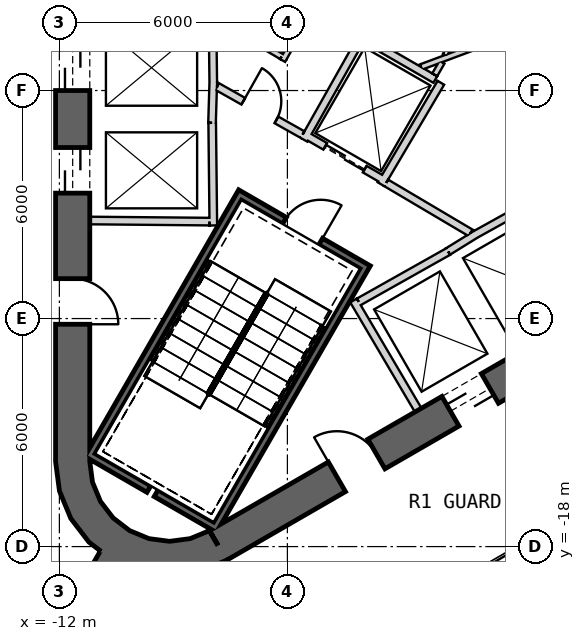
"""IFC4 building model, lengths in metres.
Left out: names, types, materials, properties, quantities, classifications, styles, units other than length and angle.
Written with IfcOpenShell. Run it as: python <this file> out.ifc"""

import sys

from ifc_helpers import new_model, si_unit, direction, frame, frame_2d, origin, place, context, subcontext, project, spatial, polyline, rectangle, outline, extrude, element, fill, save


model = new_model("IFC4")
c1 = context("Model", 3, precision=1e-05, world=origin(), true_north=direction((0.0, 1.0)))
c2 = subcontext(c1, "Body", "Model", "MODEL_VIEW")
j1 = project(units=[si_unit("LENGTHUNIT", "METRE"), si_unit("PLANEANGLEUNIT", "RADIAN")], contexts=[c1])
p1 = place(None, origin())
s1 = spatial("IfcSite", under=j1, at=p1, CompositionType="ELEMENT")
p2 = place(p1, origin())
s2 = spatial("IfcBuilding", under=s1, at=p2, CompositionType="ELEMENT")
p3 = place(p2, frame((0.0, 0.0, 15.5)))
s3 = spatial("IfcBuildingStorey", under=s2, at=p3, CompositionType="ELEMENT", Elevation=15.5)
p4 = place(p3, frame((-11.65, 15.762, 0.0), z_axis=(0.0, 0.0, 1.0), x_axis=(0.0, -1.0, 0.0)))
e1 = element("IfcWall", 1, at=p4, inside=s3, PredefinedType="SHEAR", context=c2, shape_type="SweptSolid", body=[
    extrude(rectangle(XDim=31.523, YDim=0.9, at=frame_2d((15.762, 0.0))), origin(), (0.0, 0.0, 1.0), 6.0),
])
p5 = place(p4, frame((7.062, 0.0, 0.0)))
e2 = element("IfcOpeningElement", 2, at=p5, cuts=e1, PredefinedType="OPENING", context=c2, shape_type="SweptSolid", body=[
    extrude(rectangle(XDim=1.2, YDim=2.4, at=frame_2d((0.6, 1.2))), frame((0.0, 0.46, 0.0), z_axis=(0.0, -1.0, 0.0), x_axis=(1.0, 0.0, 0.0)), (0.0, 0.0, 1.0), 0.92),
])
p6 = place(p4, frame((9.762, 0.0, 0.0)))
e3 = element("IfcOpeningElement", 3, at=p6, cuts=e1, PredefinedType="OPENING", context=c2, shape_type="SweptSolid", body=[
    extrude(rectangle(XDim=1.2, YDim=2.4, at=frame_2d((0.6, 1.2))), frame((0.0, 0.46, 0.0), z_axis=(0.0, -1.0, 0.0), x_axis=(1.0, 0.0, 0.0)), (0.0, 0.0, 1.0), 0.92),
])
p7 = place(p4, frame((12.462, 0.0, 0.0)))
e4 = element("IfcOpeningElement", 4, at=p7, cuts=e1, PredefinedType="OPENING", context=c2, shape_type="SweptSolid", body=[
    extrude(rectangle(XDim=1.2, YDim=2.4, at=frame_2d((0.6, 1.2))), frame((0.0, 0.46, 0.0), z_axis=(0.0, -1.0, 0.0), x_axis=(1.0, 0.0, 0.0)), (0.0, 0.0, 1.0), 0.92),
])
p8 = place(p4, frame((15.162, 0.0, 0.0)))
e5 = element("IfcOpeningElement", 5, at=p8, cuts=e1, PredefinedType="OPENING", context=c2, shape_type="SweptSolid", body=[
    extrude(rectangle(XDim=1.2, YDim=2.4, at=frame_2d((0.6, 1.2))), frame((0.0, 0.46, 0.0), z_axis=(0.0, -1.0, 0.0), x_axis=(1.0, 0.0, 0.0)), (0.0, 0.0, 1.0), 0.92),
])
p9 = place(p4, frame((17.862, 0.0, 0.0)))
e6 = element("IfcOpeningElement", 6, at=p9, cuts=e1, PredefinedType="OPENING", context=c2, shape_type="SweptSolid", body=[
    extrude(rectangle(XDim=1.2, YDim=2.4, at=frame_2d((0.6, 1.2))), frame((0.0, 0.46, 0.0), z_axis=(0.0, -1.0, 0.0), x_axis=(1.0, 0.0, 0.0)), (0.0, 0.0, 1.0), 0.92),
])
p10 = place(p4, frame((20.562, 0.0, 0.0)))
e7 = element("IfcOpeningElement", 7, at=p10, cuts=e1, PredefinedType="OPENING", context=c2, shape_type="SweptSolid", body=[
    extrude(rectangle(XDim=1.2, YDim=2.4, at=frame_2d((0.6, 1.2))), frame((0.0, 0.46, 0.0), z_axis=(0.0, -1.0, 0.0), x_axis=(1.0, 0.0, 0.0)), (0.0, 0.0, 1.0), 0.92),
])
p11 = place(p4, frame((23.262, 0.0, 0.0)))
e8 = element("IfcOpeningElement", 8, at=p11, cuts=e1, PredefinedType="OPENING", context=c2, shape_type="SweptSolid", body=[
    extrude(rectangle(XDim=1.2, YDim=2.4, at=frame_2d((0.6, 1.2))), frame((0.0, 0.46, 0.0), z_axis=(0.0, -1.0, 0.0), x_axis=(1.0, 0.0, 0.0)), (0.0, 0.0, 1.0), 0.92),
])
p12 = place(p4, frame((3.612, 0.0, 0.0)))
e9 = element("IfcOpeningElement", 9, at=p12, cuts=e1, PredefinedType="OPENING", context=c2, shape_type="SweptSolid", body=[
    extrude(rectangle(XDim=1.2, YDim=2.4, at=frame_2d((0.6, 1.2))), frame((0.0, 0.46, 0.0), z_axis=(0.0, -1.0, 0.0), x_axis=(1.0, 0.0, 0.0)), (0.0, 0.0, 1.0), 0.92),
])
p13 = place(p4, frame((26.712, 0.0, 0.0)))
e10 = element("IfcOpeningElement", 10, at=p13, cuts=e1, PredefinedType="OPENING", context=c2, shape_type="SweptSolid", body=[
    extrude(rectangle(XDim=1.2, YDim=2.4, at=frame_2d((0.6, 1.2))), frame((0.0, 0.46, 0.0), z_axis=(0.0, -1.0, 0.0), x_axis=(1.0, 0.0, 0.0)), (0.0, 0.0, 1.0), 0.92),
])
p14 = place(p3, frame((-7.825, -17.97, 0.0), z_axis=(0.0, 0.0, 1.0), x_axis=(0.866028369851, 0.499994862586, 0.0)))
e11 = element("IfcWall", 11, at=p14, inside=s3, PredefinedType="SHEAR", context=c2, shape_type="SweptSolid", body=[
    extrude(rectangle(XDim=31.523, YDim=0.9, at=frame_2d((15.762, 0.0))), origin(), (0.0, 0.0, 1.0), 6.0),
])
p15 = place(p14, frame((7.062, 0.0, 0.0)))
e12 = element("IfcOpeningElement", 12, at=p15, cuts=e11, PredefinedType="OPENING", context=c2, shape_type="SweptSolid", body=[
    extrude(rectangle(XDim=1.2, YDim=2.4, at=frame_2d((0.6, 1.2))), frame((0.0, 0.46, 0.0), z_axis=(0.0, -1.0, 0.0), x_axis=(1.0, 0.0, 0.0)), (0.0, 0.0, 1.0), 0.92),
])
p16 = place(p14, frame((9.762, 0.0, 0.0)))
e13 = element("IfcOpeningElement", 13, at=p16, cuts=e11, PredefinedType="OPENING", context=c2, shape_type="SweptSolid", body=[
    extrude(rectangle(XDim=1.2, YDim=2.4, at=frame_2d((0.6, 1.2))), frame((0.0, 0.46, 0.0), z_axis=(0.0, -1.0, 0.0), x_axis=(1.0, 0.0, 0.0)), (0.0, 0.0, 1.0), 0.92),
])
p17 = place(p14, frame((12.462, 0.0, 0.0)))
e14 = element("IfcOpeningElement", 14, at=p17, cuts=e11, PredefinedType="OPENING", context=c2, shape_type="SweptSolid", body=[
    extrude(rectangle(XDim=1.2, YDim=2.4, at=frame_2d((0.6, 1.2))), frame((0.0, 0.46, 0.0), z_axis=(0.0, -1.0, 0.0), x_axis=(1.0, 0.0, 0.0)), (0.0, 0.0, 1.0), 0.92),
])
p18 = place(p14, frame((15.162, 0.0, 0.0)))
e15 = element("IfcOpeningElement", 15, at=p18, cuts=e11, PredefinedType="OPENING", context=c2, shape_type="SweptSolid", body=[
    extrude(rectangle(XDim=1.2, YDim=2.4, at=frame_2d((0.6, 1.2))), frame((0.0, 0.46, 0.0), z_axis=(0.0, -1.0, 0.0), x_axis=(1.0, 0.0, 0.0)), (0.0, 0.0, 1.0), 0.92),
])
p19 = place(p14, frame((17.862, 0.0, 0.0)))
e16 = element("IfcOpeningElement", 16, at=p19, cuts=e11, PredefinedType="OPENING", context=c2, shape_type="SweptSolid", body=[
    extrude(rectangle(XDim=1.2, YDim=2.4, at=frame_2d((0.6, 1.2))), frame((0.0, 0.46, 0.0), z_axis=(0.0, -1.0, 0.0), x_axis=(1.0, 0.0, 0.0)), (0.0, 0.0, 1.0), 0.92),
])
p20 = place(p14, frame((20.562, 0.0, 0.0)))
e17 = element("IfcOpeningElement", 17, at=p20, cuts=e11, PredefinedType="OPENING", context=c2, shape_type="SweptSolid", body=[
    extrude(rectangle(XDim=1.2, YDim=2.4, at=frame_2d((0.6, 1.2))), frame((0.0, 0.46, 0.0), z_axis=(0.0, -1.0, 0.0), x_axis=(1.0, 0.0, 0.0)), (0.0, 0.0, 1.0), 0.92),
])
p21 = place(p14, frame((26.712, 0.0, 0.0)))
e18 = element("IfcOpeningElement", 18, at=p21, cuts=e11, PredefinedType="OPENING", context=c2, shape_type="SweptSolid", body=[
    extrude(rectangle(XDim=1.2, YDim=2.4, at=frame_2d((0.6, 1.2))), frame((0.0, 0.46, 0.0), z_axis=(0.0, -1.0, 0.0), x_axis=(1.0, 0.0, 0.0)), (0.0, 0.0, 1.0), 0.92),
])
p22 = place(p14, frame((3.612, 0.0, 0.0)))
e19 = element("IfcOpeningElement", 19, at=p22, cuts=e11, PredefinedType="OPENING", context=c2, shape_type="SweptSolid", body=[
    extrude(rectangle(XDim=1.2, YDim=2.4, at=frame_2d((0.6, 1.2))), frame((0.0, 0.46, 0.0), z_axis=(0.0, -1.0, 0.0), x_axis=(1.0, 0.0, 0.0)), (0.0, 0.0, 1.0), 0.92),
])
p23 = place(p3, origin())
e20 = element("IfcWall", 20, at=p23, inside=s3, PredefinedType="SHEAR", context=c2, shape_type="SweptSolid", body=[
    extrude(outline(polyline([(-12.1, -15.762), (-11.998, -16.538), (-11.698, -17.262), (-11.221, -17.883), (-10.6, -18.36), (-9.876, -18.659), (-9.1, -18.762), (-8.323, -18.659), (-7.6, -18.36), (-8.05, -17.58), (-8.556, -17.79), (-9.1, -17.862), (-9.644, -17.79), (-10.15, -17.58), (-10.585, -17.247), (-10.919, -16.812), (-11.128, -16.305), (-11.2, -15.762), (-12.1, -15.762)])), origin(), (0.0, 0.0, 1.0), 6.0),
])
p24 = place(p3, frame((-10.575, -18.316, 0.0), z_axis=(0.0, 0.0, 1.0), x_axis=(-0.499996575515, -0.866027380903, 0.0)))
e21 = element("IfcWall", 21, at=p24, inside=s3, PredefinedType="SHEAR", context=c2, shape_type="SweptSolid", body=[
    extrude(rectangle(XDim=13.954, YDim=0.8, at=frame_2d((6.977, 0.0))), origin(), (0.0, 0.0, 1.0), 6.0),
])
p25 = place(p24, frame((2.05, 0.0, 0.0)))
e22 = element("IfcOpeningElement", 22, at=p25, cuts=e21, PredefinedType="OPENING", context=c2, shape_type="SweptSolid", body=[
    extrude(rectangle(XDim=1.4, YDim=2.4, at=frame_2d((0.7, 1.2))), frame((0.0, 0.41, 0.0), z_axis=(0.0, -1.0, 0.0), x_axis=(1.0, 0.0, 0.0)), (0.0, 0.0, 1.0), 0.82),
])
p26 = place(p3, frame((-7.95, -5.772, 0.0), z_axis=(0.0, 0.0, 1.0), x_axis=(-0.030803413295, -0.999525462272, 0.0)))
e23 = element("IfcWall", 23, at=p26, inside=s3, PredefinedType="PLUMBINGWALL", context=c2, shape_type="SweptSolid", body=[
    extrude(rectangle(XDim=1.078, YDim=0.2, at=frame_2d((0.539, 0.0))), origin(), (0.0, 0.0, 1.0), 5.7),
])
p27 = place(p3, frame((-7.971, -4.05, 0.0), z_axis=(0.0, 0.0, 1.0), x_axis=(0.012042535896, -0.999927486035, 0.0)))
e24 = element("IfcWall", 24, at=p27, inside=s3, PredefinedType="PLUMBINGWALL", context=c2, shape_type="SweptSolid", body=[
    extrude(rectangle(XDim=1.845, YDim=0.2, at=frame_2d((0.922, 0.0))), origin(), (0.0, 0.0, 1.0), 5.7),
])
p28 = place(p3, frame((-7.979, -6.85, 0.0), z_axis=(0.0, 0.0, 1.0), x_axis=(0.011121475088, -0.999938154483, 0.0)))
e25 = element("IfcWall", 25, at=p28, inside=s3, PredefinedType="PLUMBINGWALL", context=c2, shape_type="SweptSolid", body=[
    extrude(rectangle(XDim=2.7, YDim=0.2, at=frame_2d((1.35, 0.0))), origin(), (0.0, 0.0, 1.0), 5.7),
])
p29 = place(p3, frame((-8.05, -9.449, 0.0), z_axis=(0.0, 0.0, 1.0), x_axis=(-0.999957467379, 0.009222983926, 0.0)))
e26 = element("IfcWall", 26, at=p29, inside=s3, PredefinedType="PLUMBINGWALL", context=c2, shape_type="SweptSolid", body=[
    extrude(rectangle(XDim=3.15, YDim=0.2, at=frame_2d((1.575, 0.0))), origin(), (0.0, 0.0, 1.0), 5.7),
])
p30 = place(p3, frame((-2.558, -14.409, 0.0), z_axis=(0.0, 0.0, 1.0), x_axis=(-0.507997497166, 0.861358544901, 0.0)))
e27 = element("IfcWall", 27, at=p30, inside=s3, PredefinedType="PLUMBINGWALL", context=c2, shape_type="SweptSolid", body=[
    extrude(rectangle(XDim=3.35, YDim=0.2, at=frame_2d((1.675, 0.0))), origin(), (0.0, 0.0, 1.0), 5.7),
])
p31 = place(p3, frame((-1.769, -10.237, 0.0), z_axis=(0.0, 0.0, 1.0), x_axis=(-0.871534483978, -0.490334215854, 0.0)))
e28 = element("IfcWall", 28, at=p31, inside=s3, PredefinedType="PLUMBINGWALL", context=c2, shape_type="SweptSolid", body=[
    extrude(rectangle(XDim=2.7, YDim=0.2, at=frame_2d((1.35, 0.0))), origin(), (0.0, 0.0, 1.0), 5.7),
])
p32 = place(p3, frame((-1.024, -9.771, 0.0), z_axis=(0.0, 0.0, 1.0), x_axis=(-0.850348075135, -0.526220629693, 0.0)))
e29 = element("IfcWall", 29, at=p32, inside=s3, PredefinedType="PLUMBINGWALL", context=c2, shape_type="SweptSolid", body=[
    extrude(rectangle(XDim=0.878, YDim=0.2, at=frame_2d((0.439, 0.0))), origin(), (0.0, 0.0, 1.0), 5.7),
])
p33 = place(p3, frame((-1.13, -9.831, 0.0), z_axis=(0.0, 0.0, 1.0), x_axis=(0.874269620932, 0.485440655401, 0.0)))
e30 = element("IfcWall", 30, at=p33, inside=s3, PredefinedType="PLUMBINGWALL", context=c2, shape_type="SweptSolid", body=[
    extrude(rectangle(XDim=1.845, YDim=0.2, at=frame_2d((0.922, 0.0))), origin(), (0.0, 0.0, 1.0), 5.7),
])
p34 = place(p3, frame((-3.905, -10.563, -0.3), z_axis=(0.0, 0.0, 1.0), x_axis=(-0.500012932018, -0.866017937352, 0.0)))
e31 = element("IfcWall", 31, at=p34, inside=s3, PredefinedType="SHEAR", context=c2, shape_type="SweptSolid", body=[
    extrude(rectangle(XDim=8.1, YDim=0.2, at=frame_2d((4.05, 0.0))), origin(), (0.0, 0.0, 1.0), 6.0),
])
p35 = place(p3, frame((-11.282, -15.541, -0.3), z_axis=(0.0, 0.0, 1.0), x_axis=(0.866000578957, -0.500042995397, 0.0)))
e32 = element("IfcWall", 32, at=p35, inside=s3, PredefinedType="SHEAR", context=c2, shape_type="SweptSolid", body=[
    extrude(rectangle(XDim=1.89, YDim=0.2, at=frame_2d((0.945, 0.0))), origin(), (0.0, 0.0, 1.0), 6.0),
])
p36 = place(p3, frame((-9.455, -16.596, -0.3), z_axis=(0.0, 0.0, 1.0), x_axis=(0.866038843867, -0.499976720371, 0.0)))
e33 = element("IfcWall", 33, at=p36, inside=s3, PredefinedType="SHEAR", context=c2, shape_type="SweptSolid", body=[
    extrude(rectangle(XDim=1.69, YDim=0.2, at=frame_2d((0.845, 0.0))), origin(), (0.0, 0.0, 1.0), 6.0),
])
p37 = place(p3, frame((-7.196, -8.663, -0.3), z_axis=(0.0, 0.0, 1.0), x_axis=(-0.499997992926, -0.866026562566, 0.0)))
e34 = element("IfcWall", 34, at=p37, inside=s3, PredefinedType="SHEAR", context=c2, shape_type="SweptSolid", body=[
    extrude(rectangle(XDim=7.9, YDim=0.2, at=frame_2d((3.95, 0.0))), origin(), (0.0, 0.0, 1.0), 6.0),
])
p38 = place(p3, frame((-4.041, -10.599, -0.3), z_axis=(0.0, 0.0, 1.0), x_axis=(-0.866047807691, 0.499961193289, 0.0)))
e35 = element("IfcWall", 35, at=p38, inside=s3, PredefinedType="SHEAR", context=c2, shape_type="SweptSolid", body=[
    extrude(rectangle(XDim=3.6, YDim=0.2, at=frame_2d((1.8, 0.0))), origin(), (0.0, 0.0, 1.0), 6.0),
])
p39 = place(p38, frame((1.25, 0.0, 0.3)))
e36 = element("IfcOpeningElement", 36, at=p39, cuts=e35, PredefinedType="OPENING", context=c2, shape_type="SweptSolid", body=[
    extrude(rectangle(XDim=1.1, YDim=2.1, at=frame_2d((0.55, 1.05))), frame((0.0, 0.11, 0.0), z_axis=(0.0, -1.0, 0.0), x_axis=(1.0, 0.0, 0.0)), (0.0, 0.0, 1.0), 0.22),
])
p40 = place(p3, frame((-3.446, -8.368, 0.0), z_axis=(0.0, 0.0, 1.0), x_axis=(-0.866024647952, 0.500001309137, 0.0)))
e37 = element("IfcWall", 37, at=p40, inside=s3, PredefinedType="PLUMBINGWALL", context=c2, shape_type="SweptSolid", body=[
    extrude(rectangle(XDim=2.4, YDim=0.2, at=frame_2d((1.2, 0.0))), origin(), (0.0, 0.0, 1.0), 5.7),
])
p41 = place(p40, frame((0.6, 0.0, 0.0)))
e38 = element("IfcOpeningElement", 38, at=p41, cuts=e37, PredefinedType="OPENING", context=c2, shape_type="SweptSolid", body=[
    extrude(rectangle(XDim=1.2, YDim=2.4, at=frame_2d((0.6, 1.2))), frame((0.0, 0.11, 0.0), z_axis=(0.0, -1.0, 0.0), x_axis=(1.0, 0.0, 0.0)), (0.0, 0.0, 1.0), 0.22),
])
p42 = place(p3, frame((-1.961, -5.796, 0.0), z_axis=(0.0, 0.0, 1.0), x_axis=(-0.508647062354, -0.860975125052, 0.0)))
e39 = element("IfcWall", 39, at=p42, inside=s3, PredefinedType="PLUMBINGWALL", context=c2, shape_type="SweptSolid", body=[
    extrude(rectangle(XDim=3.1, YDim=0.2, at=frame_2d((1.55, 0.0))), origin(), (0.0, 0.0, 1.0), 5.7),
])
p43 = place(p3, frame((-3.99, -4.509, 0.0), z_axis=(0.0, 0.0, 1.0), x_axis=(-0.491358283181, -0.870957540612, 0.0)))
e40 = element("IfcWall", 40, at=p43, inside=s3, PredefinedType="PLUMBINGWALL", context=c2, shape_type="SweptSolid", body=[
    extrude(rectangle(XDim=3.2, YDim=0.2, at=frame_2d((1.6, 0.0))), origin(), (0.0, 0.0, 1.0), 5.7),
])
p44 = place(p3, frame((-3.953, -4.646, 0.0), z_axis=(0.0, 0.0, 1.0), x_axis=(0.866040491692, -0.499973866067, 0.0)))
e41 = element("IfcWall", 41, at=p44, inside=s3, PredefinedType="PLUMBINGWALL", context=c2, shape_type="SweptSolid", body=[
    extrude(rectangle(XDim=2.129, YDim=0.2, at=frame_2d((1.065, 0.0))), origin(), (0.0, 0.0, 1.0), 5.7),
])
p45 = place(p3, frame((-3.401, -8.43, 0.0), z_axis=(0.0, 0.0, 1.0), x_axis=(0.860615607571, -0.509255118781, 0.0)))
e42 = element("IfcWall", 42, at=p45, inside=s3, PredefinedType="PARTITIONING", context=c2, shape_type="SweptSolid", body=[
    extrude(rectangle(XDim=2.581, YDim=0.2, at=frame_2d((1.29, 0.0))), origin(), (0.0, 0.0, 1.0), 5.7),
])
p46 = place(p3, frame((-7.849, -5.894, 0.0), z_axis=(0.0, 0.0, 1.0), x_axis=(0.871363259478, -0.490638431059, 0.0)))
e43 = element("IfcWall", 43, at=p46, inside=s3, PredefinedType="PARTITIONING", context=c2, shape_type="SweptSolid", body=[
    extrude(rectangle(XDim=2.581, YDim=0.2, at=frame_2d((1.291, 0.0))), origin(), (0.0, 0.0, 1.0), 5.7),
])
p47 = place(p46, frame((0.791, 0.0, 0.0)))
e44 = element("IfcOpeningElement", 44, at=p47, cuts=e43, PredefinedType="OPENING", context=c2, shape_type="SweptSolid", body=[
    extrude(rectangle(XDim=1.0, YDim=2.1, at=frame_2d((0.5, 1.05))), frame((0.0, 0.11, 0.0), z_axis=(0.0, -1.0, 0.0), x_axis=(1.0, 0.0, 0.0)), (0.0, 0.0, 1.0), 0.22),
])
p48 = place(p3, frame((4.807, -2.659, 0.0), z_axis=(0.0, 0.0, 1.0), x_axis=(-0.936818342118, -0.349816228714, 0.0)))
e45 = element("IfcWall", 45, at=p48, inside=s3, PredefinedType="PLUMBINGWALL", context=c2, shape_type="SweptSolid", body=[
    extrude(rectangle(XDim=7.78, YDim=0.15, at=frame_2d((3.89, 0.0))), origin(), (0.0, 0.0, 1.0), 5.7),
])
p49 = place(p3, frame((0.182, -1.535, 0.0), z_axis=(0.0, 0.0, 1.0), x_axis=(-0.499988401207, -0.866032100247, 0.0)))
e46 = element("IfcWall", 46, at=p49, inside=s3, PredefinedType="PARTITIONING", context=c2, shape_type="SweptSolid", body=[
    extrude(rectangle(XDim=4.079, YDim=0.12, at=frame_2d((2.04, 0.0))), origin(), (0.0, 0.0, 1.0), 5.7),
])
p50 = place(p49, frame((1.691, 0.0, 0.0)))
e47 = element("IfcOpeningElement", 47, at=p50, cuts=e46, PredefinedType="OPENING", context=c2, shape_type="SweptSolid", body=[
    extrude(rectangle(XDim=0.8, YDim=2.1, at=frame_2d((0.4, 1.05))), frame((0.0, 0.07, 0.0), z_axis=(0.0, -1.0, 0.0), x_axis=(1.0, 0.0, 0.0)), (0.0, 0.0, 1.0), 0.14),
])
p51 = place(p3, frame((-1.932, -5.256, 0.0), z_axis=(0.0, 0.0, 1.0), x_axis=(-0.499777709171, -0.866153705422, 0.0)))
e48 = element("IfcWall", 48, at=p51, inside=s3, PredefinedType="PLUMBINGWALL", context=c2, shape_type="SweptSolid", body=[
    extrude(rectangle(XDim=0.383, YDim=0.15, at=frame_2d((0.191, 0.0))), origin(), (0.0, 0.0, 1.0), 5.7),
])
p52 = place(p3, frame((-6.125, -5.211, 0.0), z_axis=(0.0, 0.0, 1.0), x_axis=(0.488762436737, 0.87241691893, 0.0)))
e49 = element("IfcWall", 49, at=p52, inside=s3, PredefinedType="PLUMBINGWALL", context=c2, shape_type="SweptSolid", body=[
    extrude(rectangle(XDim=2.337, YDim=0.15, at=frame_2d((1.168, 0.0))), origin(), (0.0, 0.0, 1.0), 5.7),
])
p53 = place(p52, frame((0.806, 0.0, 0.0)))
e50 = element("IfcOpeningElement", 50, at=p53, cuts=e49, PredefinedType="OPENING", context=c2, shape_type="SweptSolid", body=[
    extrude(rectangle(XDim=0.8, YDim=2.1, at=frame_2d((0.4, 1.05))), frame((0.0, 0.085, 0.0), z_axis=(0.0, -1.0, 0.0), x_axis=(1.0, 0.0, 0.0)), (0.0, 0.0, 1.0), 0.17),
])
p54 = place(p3, frame((-7.95, -4.041, 0.0), z_axis=(0.0, 0.0, 1.0), x_axis=(0.860090281069, -0.510141851263, 0.0)))
e51 = element("IfcWall", 51, at=p54, inside=s3, PredefinedType="PLUMBINGWALL", context=c2, shape_type="SweptSolid", body=[
    extrude(rectangle(XDim=2.089, YDim=0.15, at=frame_2d((1.045, 0.0))), origin(), (0.0, 0.0, 1.0), 5.7),
])
p55 = place(p39, origin())
e52 = element("IfcDoor", 52, at=p55, inside=s3, OperationType="SINGLE_SWING_LEFT", PredefinedType="USERDEFINED", context=c2, shape_type="SweptSolid", body=[
    extrude(rectangle(XDim=1.1, YDim=2.1, at=frame_2d((0.55, 1.05))), frame((0.0, 0.025, 0.0), z_axis=(0.0, -1.0, 0.0), x_axis=(1.0, 0.0, 0.0)), (0.0, 0.0, 1.0), 0.05),
])
fill(e36, e52)
p56 = place(p47, origin())
e53 = element("IfcDoor", 53, at=p56, inside=s3, OperationType="SINGLE_SWING_LEFT", PredefinedType="USERDEFINED", context=c2, shape_type="SweptSolid", body=[
    extrude(rectangle(XDim=1.0, YDim=2.1, at=frame_2d((0.5, 1.05))), frame((0.0, 0.025, 0.0), z_axis=(0.0, -1.0, 0.0), x_axis=(1.0, 0.0, 0.0)), (0.0, 0.0, 1.0), 0.05),
])
fill(e44, e53)
p57 = place(p41, origin())
e54 = element("IfcDoor", 54, at=p57, inside=s3, OperationType="SLIDING_TO_LEFT", PredefinedType="USERDEFINED", context=c2, shape_type="SweptSolid", body=[
    extrude(rectangle(XDim=1.2, YDim=2.4, at=frame_2d((0.6, 1.2))), frame((0.0, 0.025, 0.0), z_axis=(0.0, -1.0, 0.0), x_axis=(1.0, 0.0, 0.0)), (0.0, 0.0, 1.0), 0.05),
])
fill(e38, e54)
p58 = place(p10, origin())
e55 = element("IfcDoor", 55, at=p58, inside=s3, OperationType="SLIDING_TO_LEFT", PredefinedType="USERDEFINED", context=c2, shape_type="SweptSolid", body=[
    extrude(rectangle(XDim=1.2, YDim=2.4, at=frame_2d((0.6, 1.2))), frame((0.0, 0.025, 0.0), z_axis=(0.0, -1.0, 0.0), x_axis=(1.0, 0.0, 0.0)), (0.0, 0.0, 1.0), 0.05),
])
fill(e7, e55)
p59 = place(p11, origin())
e56 = element("IfcDoor", 56, at=p59, inside=s3, OperationType="SLIDING_TO_LEFT", PredefinedType="USERDEFINED", context=c2, shape_type="SweptSolid", body=[
    extrude(rectangle(XDim=1.2, YDim=2.4, at=frame_2d((0.6, 1.2))), frame((0.0, 0.025, 0.0), z_axis=(0.0, -1.0, 0.0), x_axis=(1.0, 0.0, 0.0)), (0.0, 0.0, 1.0), 0.05),
])
fill(e8, e56)
p60 = place(p15, origin())
e57 = element("IfcDoor", 57, at=p60, inside=s3, OperationType="SLIDING_TO_LEFT", PredefinedType="USERDEFINED", context=c2, shape_type="SweptSolid", body=[
    extrude(rectangle(XDim=1.2, YDim=2.4, at=frame_2d((0.6, 1.2))), frame((0.0, 0.025, 0.0), z_axis=(0.0, -1.0, 0.0), x_axis=(1.0, 0.0, 0.0)), (0.0, 0.0, 1.0), 0.05),
])
fill(e12, e57)
p61 = place(p13, origin())
e58 = element("IfcDoor", 58, at=p61, inside=s3, OperationType="SINGLE_SWING_RIGHT", PredefinedType="USERDEFINED", context=c2, shape_type="SweptSolid", body=[
    extrude(rectangle(XDim=1.2, YDim=2.4, at=frame_2d((0.6, 1.2))), frame((0.0, 0.025, 0.0), z_axis=(0.0, -1.0, 0.0), x_axis=(1.0, 0.0, 0.0)), (0.0, 0.0, 1.0), 0.05),
])
fill(e10, e58)
p62 = place(p22, origin())
e59 = element("IfcDoor", 59, at=p62, inside=s3, OperationType="SINGLE_SWING_LEFT", PredefinedType="USERDEFINED", context=c2, shape_type="SweptSolid", body=[
    extrude(rectangle(XDim=1.2, YDim=2.4, at=frame_2d((0.6, 1.2))), frame((0.0, 0.025, 0.0), z_axis=(0.0, -1.0, 0.0), x_axis=(1.0, 0.0, 0.0)), (0.0, 0.0, 1.0), 0.05),
])
fill(e19, e59)
save(model, sys.argv[1])
